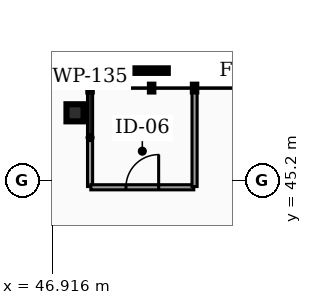
"""IFC4 building model, lengths in metres.
Left out: names, types, materials, properties, quantities, classifications, styles, units other than length and angle.
Written with IfcOpenShell. Run it as: python <this file> out.ifc"""

import sys

from ifc_helpers import new_model, si_unit, direction, frame, frame_2d, origin, origin_2d, place, context, subcontext, project, spatial, rectangle, hollow_rectangle, extrude, element, fill, save


model = new_model("IFC4")
c1 = context("Model", 3, precision=1e-05, world=origin(), true_north=direction((0.0, 1.0)))
c2 = subcontext(c1, "Body", "Model", "MODEL_VIEW")
j1 = project(units=[si_unit("LENGTHUNIT", "METRE"), si_unit("PLANEANGLEUNIT", "RADIAN")], contexts=[c1])
p1 = place(None, origin())
s1 = spatial("IfcSite", under=j1, at=p1, CompositionType="ELEMENT")
p2 = place(p1, origin())
s2 = spatial("IfcBuilding", under=s1, at=p2, CompositionType="ELEMENT")
p3 = place(p2, frame((0.0, 0.0, 282.2)))
s3 = spatial("IfcBuildingStorey", under=s2, at=p3, CompositionType="ELEMENT", Elevation=282.2)
p4 = place(p3, frame((47.517, 46.983, 0.0), z_axis=(0.0, 0.0, 1.0), x_axis=(1.0, 0.0, 0.0)))
e1 = element("IfcColumn", 1, at=p4, inside=s3, PredefinedType="COLUMN", context=c2, shape_type="SweptSolid", body=[
    extrude(hollow_rectangle(XDim=0.45, YDim=0.45, WallThickness=0.022, at=origin_2d()), origin(), (0.0, 0.0, 1.0), 3.18),
])
p5 = place(p3, frame((47.913, 45.043, 0.0), z_axis=(0.0, 0.0, 1.0), x_axis=(0.0, 1.0, 0.0)))
e2 = element("IfcWall", 2, at=p5, inside=s3, PredefinedType="PARTITIONING", context=c2, shape_type="SweptSolid", body=[
    extrude(rectangle(XDim=2.575, YDim=0.135, at=frame_2d((1.288, 0.0))), origin(), (0.0, 0.0, 1.0), 2.235),
])
p6 = place(p3, frame((47.933, 45.023, 0.0), z_axis=(0.0, 0.0, 1.0), x_axis=(1.0, 0.0, 0.0)))
e3 = element("IfcWall", 3, at=p6, inside=s3, PredefinedType="PARTITIONING", context=c2, shape_type="SweptSolid", body=[
    extrude(rectangle(XDim=2.71, YDim=0.135, at=frame_2d((1.355, 0.0))), origin(), (0.0, 0.0, 1.0), 2.235),
])
p7 = place(p6, frame((0.925, 0.0, 0.0)))
e4 = element("IfcOpeningElement", 4, at=p7, cuts=e3, PredefinedType="OPENING", context=c2, shape_type="SweptSolid", body=[
    extrude(rectangle(XDim=0.86, YDim=2.05, at=frame_2d((0.43, 1.025))), frame((0.0, 0.077, 0.0), z_axis=(0.0, -1.0, 0.0), x_axis=(1.0, 0.0, 0.0)), (0.0, 0.0, 1.0), 0.155),
])
p8 = place(p3, frame((50.663, 45.043, 0.0), z_axis=(0.0, 0.0, 1.0), x_axis=(0.0, 1.0, 0.0)))
e5 = element("IfcWall", 5, at=p8, inside=s3, PredefinedType="PARTITIONING", context=c2, shape_type="SweptSolid", body=[
    extrude(rectangle(XDim=2.575, YDim=0.135, at=frame_2d((1.288, 0.0))), origin(), (0.0, 0.0, 1.0), 2.235),
])
p9 = place(p7, origin())
e6 = element("IfcDoor", 6, at=p9, inside=s3, OperationType="SINGLE_SWING_RIGHT", PredefinedType="DOOR", context=c2, shape_type="SweptSolid", body=[
    extrude(rectangle(XDim=0.86, YDim=2.05, at=frame_2d((0.43, 1.025))), frame((0.0, 0.025, 0.0), z_axis=(0.0, -1.0, 0.0), x_axis=(1.0, 0.0, 0.0)), (0.0, 0.0, 1.0), 0.05),
])
fill(e4, e6)
save(model, sys.argv[1])
